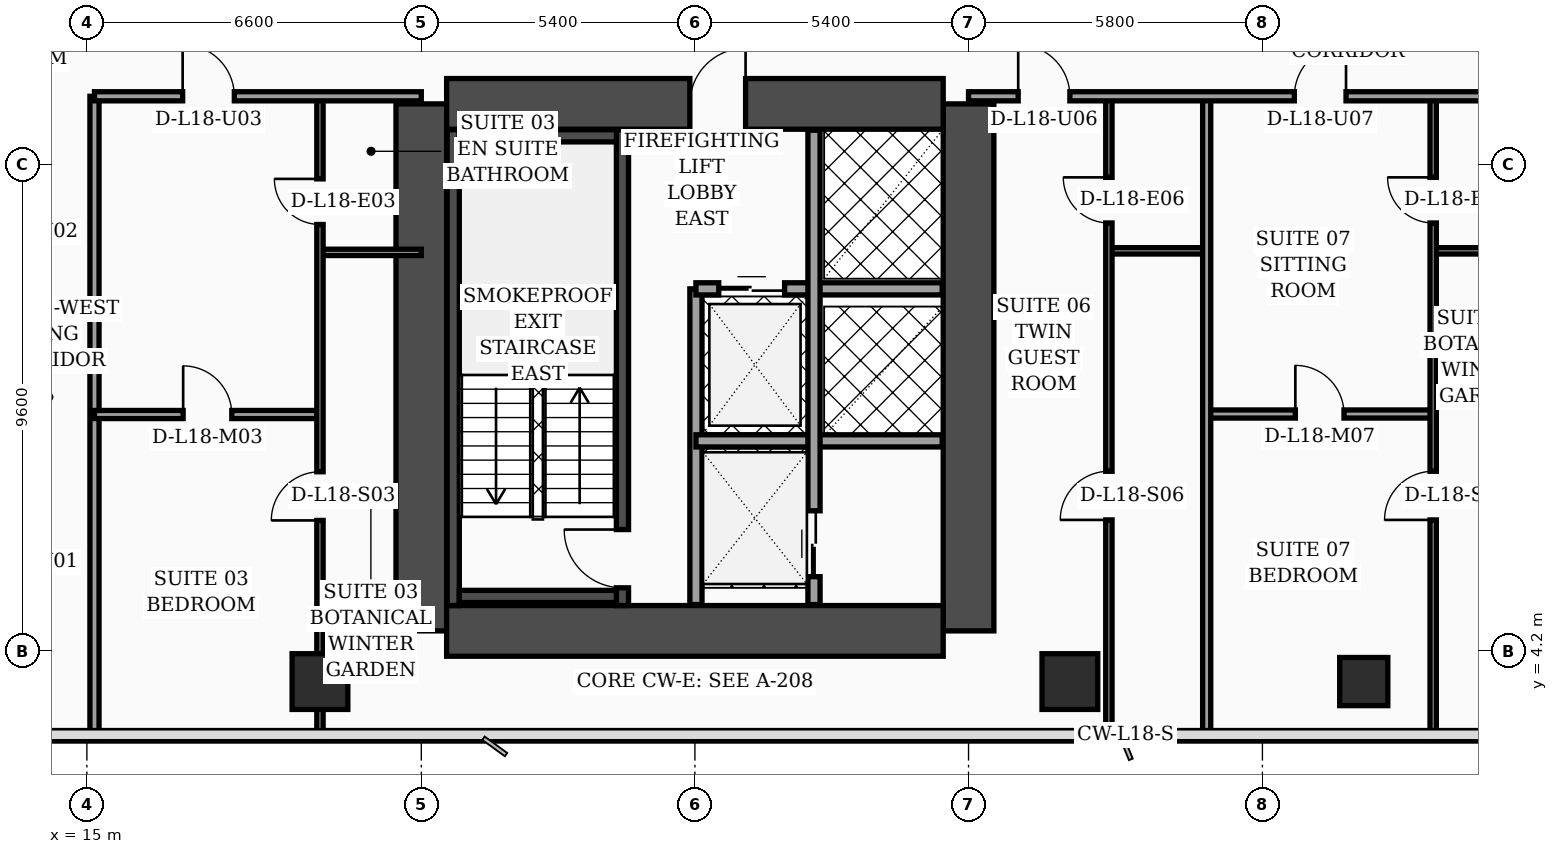
"""IFC4 building model, lengths in metres.
Left out: names, types, materials, properties, quantities, classifications, styles, units other than length and angle.
Written with IfcOpenShell. Run it as: python <this file> out.ifc"""

import sys

from ifc_helpers import new_model, si_unit, direction, frame, frame_2d, origin, origin_2d, place, context, subcontext, project, spatial, rectangle, hollow_rectangle, extrude, element, fill, save


model = new_model("IFC4")
c1 = context("Model", 3, precision=1e-05, world=origin(), true_north=direction((0.0, 1.0)))
c2 = subcontext(c1, "Body", "Model", "MODEL_VIEW")
j1 = project(units=[si_unit("LENGTHUNIT", "METRE"), si_unit("PLANEANGLEUNIT", "RADIAN")], contexts=[c1])
p1 = place(None, origin())
s1 = spatial("IfcSite", under=j1, at=p1, CompositionType="ELEMENT")
p2 = place(p1, origin())
s2 = spatial("IfcBuilding", under=s1, at=p2, CompositionType="ELEMENT")
p3 = place(p2, frame((0.0, 0.0, 77.4)))
s3 = spatial("IfcBuildingStorey", under=s2, at=p3, CompositionType="ELEMENT", Elevation=77.4)
for number, where, z_axis, x_axis in (
    (1, (21.6, 4.6, 0.0), (0.0, 0.0, 1.0), (0.0, 1.0, 0.0)),
    (2, (32.4, 4.6, 0.0), (0.0, 0.0, 1.0), (0.0, 1.0, 0.0)),
):
    element("IfcWall", number, at=place(p3, frame(where, z_axis=z_axis, x_axis=x_axis)), inside=s3, PredefinedType="SHEAR", context=c2, shape_type="SweptSolid", body=[
        extrude(rectangle(XDim=10.4, YDim=1.0, at=frame_2d((5.2, 0.0))), origin(), (0.0, 0.0, 1.0), 3.56),
    ])
p4 = place(p3, frame((22.1, 15.0, 0.0), z_axis=(0.0, 0.0, 1.0), x_axis=(1.0, 0.0, 0.0)))
e3 = element("IfcWall", 3, at=p4, inside=s3, PredefinedType="SHEAR", context=c2, shape_type="SweptSolid", body=[
    extrude(rectangle(XDim=9.8, YDim=1.0, at=frame_2d((4.9, 0.0))), origin(), (0.0, 0.0, 1.0), 3.56),
])
p5 = place(p4, frame((4.8, 0.0, 0.0)))
e4 = element("IfcOpeningElement", 4, at=p5, cuts=e3, PredefinedType="OPENING", context=c2, shape_type="SweptSolid", body=[
    extrude(rectangle(XDim=1.1, YDim=2.2, at=frame_2d((0.55, 1.1))), frame((0.0, 0.51, 0.0), z_axis=(0.0, -1.0, 0.0), x_axis=(1.0, 0.0, 0.0)), (0.0, 0.0, 1.0), 1.02),
])
p6 = place(p3, frame((22.1, 4.6, 0.0), z_axis=(0.0, 0.0, 1.0), x_axis=(1.0, 0.0, 0.0)))
e5 = element("IfcWall", 5, at=p6, inside=s3, PredefinedType="SHEAR", context=c2, shape_type="SweptSolid", body=[
    extrude(rectangle(XDim=9.8, YDim=1.0, at=frame_2d((4.9, 0.0))), origin(), (0.0, 0.0, 1.0), 3.56),
])
p7 = place(p3, frame((22.23, 5.1, 0.0), z_axis=(0.0, 0.0, 1.0), x_axis=(0.0, 1.0, 0.0)))
e6 = element("IfcWall", 6, at=p7, inside=s3, PredefinedType="SOLIDWALL", context=c2, shape_type="SweptSolid", body=[
    extrude(rectangle(XDim=9.39, YDim=0.24, at=frame_2d((4.695, 0.0))), origin(), (0.0, 0.0, 1.0), 3.56),
])
p8 = place(p3, frame((25.57, 5.1, 0.0), z_axis=(0.0, 0.0, 1.0), x_axis=(0.0, 1.0, 0.0)))
e7 = element("IfcWall", 7, at=p8, inside=s3, PredefinedType="SOLIDWALL", context=c2, shape_type="SweptSolid", body=[
    extrude(rectangle(XDim=9.39, YDim=0.24, at=frame_2d((4.695, 0.0))), origin(), (0.0, 0.0, 1.0), 3.56),
])
p9 = place(p8, frame((0.35, 0.0, 0.0)))
e8 = element("IfcOpeningElement", 8, at=p9, cuts=e7, PredefinedType="OPENING", context=c2, shape_type="SweptSolid", body=[
    extrude(rectangle(XDim=1.15, YDim=2.2, at=frame_2d((0.575, 1.1))), frame((0.0, 0.13, 0.0), z_axis=(0.0, -1.0, 0.0), x_axis=(1.0, 0.0, 0.0)), (0.0, 0.0, 1.0), 0.26),
])
for number, where, z_axis, x_axis in (
    (9, (22.35, 5.28, 0.0), (0.0, 0.0, 1.0), (1.0, 0.0, 0.0)),
    (10, (22.35, 14.37, 0.0), (0.0, 0.0, 1.0), (1.0, 0.0, 0.0)),
):
    element("IfcWall", number, at=place(p3, frame(where, z_axis=z_axis, x_axis=x_axis)), inside=s3, PredefinedType="SOLIDWALL", context=c2, shape_type="SweptSolid", body=[
        extrude(rectangle(XDim=3.1, YDim=0.24, at=frame_2d((1.55, 0.0))), origin(), (0.0, 0.0, 1.0), 3.56),
    ])
for number, where, z_axis, x_axis in (
    (11, (19.6, 3.6, 0.0), (0.0, 0.0, 1.0), (1.0, 0.0, 0.0)),
    (12, (34.4, 3.6, 0.0), (0.0, 0.0, 1.0), (1.0, 0.0, 0.0)),
):
    element("IfcColumn", number, at=place(p3, frame(where, z_axis=z_axis, x_axis=x_axis)), inside=s3, PredefinedType="COLUMN", context=c2, shape_type="SweptSolid", body=[
        extrude(hollow_rectangle(XDim=1.1, YDim=1.1, WallThickness=0.045, at=origin_2d()), origin(), (0.0, 0.0, 1.0), 3.56),
    ])
p10 = place(p3, frame((40.2, 3.6, 0.0), z_axis=(0.0, 0.0, 1.0), x_axis=(1.0, 0.0, 0.0)))
e13 = element("IfcColumn", 13, at=p10, inside=s3, PredefinedType="COLUMN", context=c2, shape_type="SweptSolid", body=[
    extrude(hollow_rectangle(XDim=0.95, YDim=0.95, WallThickness=0.04, at=origin_2d()), origin(), (0.0, 0.0, 1.0), 3.56),
])
p11 = place(p3, frame((27.02, 5.12, 0.0), z_axis=(0.0, 0.0, 1.0), x_axis=(0.0, 1.0, 0.0)))
e14 = element("IfcWall", 14, at=p11, inside=s3, PredefinedType="SOLIDWALL", context=c2, shape_type="SweptSolid", body=[
    extrude(rectangle(XDim=6.23, YDim=0.24, at=frame_2d((3.115, 0.0))), origin(), (0.0, 0.0, 1.0), 3.56),
])
p12 = place(p3, frame((27.02, 11.35, 0.0), z_axis=(0.0, 0.0, 1.0), x_axis=(1.0, 0.0, 0.0)))
e15 = element("IfcWall", 15, at=p12, inside=s3, PredefinedType="SOLIDWALL", context=c2, shape_type="SweptSolid", body=[
    extrude(rectangle(XDim=4.86, YDim=0.24, at=frame_2d((2.43, 0.0))), origin(), (0.0, 0.0, 1.0), 3.56),
])
p13 = place(p12, frame((0.45, 0.0, 0.0)))
e16 = element("IfcOpeningElement", 16, at=p13, cuts=e15, PredefinedType="OPENING", context=c2, shape_type="SweptSolid", body=[
    extrude(rectangle(XDim=1.3, YDim=2.35, at=frame_2d((0.65, 1.175))), frame((0.0, 0.13, 0.0), z_axis=(0.0, -1.0, 0.0), x_axis=(1.0, 0.0, 0.0)), (0.0, 0.0, 1.0), 0.26),
])
p14 = place(p3, frame((27.02, 8.35, 0.0), z_axis=(0.0, 0.0, 1.0), x_axis=(1.0, 0.0, 0.0)))
e17 = element("IfcWall", 17, at=p14, inside=s3, PredefinedType="SOLIDWALL", context=c2, shape_type="SweptSolid", body=[
    extrude(rectangle(XDim=4.86, YDim=0.24, at=frame_2d((2.43, 0.0))), origin(), (0.0, 0.0, 1.0), 3.56),
])
p15 = place(p3, frame((29.35, 5.12, 0.0), z_axis=(0.0, 0.0, 1.0), x_axis=(0.0, 1.0, 0.0)))
e18 = element("IfcWall", 18, at=p15, inside=s3, PredefinedType="SOLIDWALL", context=c2, shape_type="SweptSolid", body=[
    extrude(rectangle(XDim=9.36, YDim=0.24, at=frame_2d((4.68, 0.0))), origin(), (0.0, 0.0, 1.0), 3.56),
])
p16 = place(p15, frame((0.55, 0.0, 0.0)))
e19 = element("IfcOpeningElement", 19, at=p16, cuts=e18, PredefinedType="OPENING", context=c2, shape_type="SweptSolid", body=[
    extrude(rectangle(XDim=1.3, YDim=2.35, at=frame_2d((0.65, 1.175))), frame((0.0, 0.13, 0.0), z_axis=(0.0, -1.0, 0.0), x_axis=(1.0, 0.0, 0.0)), (0.0, 0.0, 1.0), 0.26),
])
p17 = place(p3, frame((15.15, 2.44, 0.0), z_axis=(0.0, 0.0, 1.0), x_axis=(0.0, 1.0, 0.0)))
e20 = element("IfcWall", 20, at=p17, inside=s3, PredefinedType="PARTITIONING", context=c2, shape_type="SweptSolid", body=[
    extrude(rectangle(XDim=12.71, YDim=0.18, at=frame_2d((6.355, 0.0))), origin(), (0.0, 0.0, 1.0), 3.04),
])
p18 = place(p3, frame((19.6, 12.07, 0.0), z_axis=(0.0, 0.0, 1.0), x_axis=(1.0, 0.0, 0.0)))
e21 = element("IfcWall", 21, at=p18, inside=s3, PredefinedType="PARTITIONING", context=c2, shape_type="SweptSolid", body=[
    extrude(rectangle(XDim=2.0, YDim=0.125, at=frame_2d((1.0, 0.0))), origin(), (0.0, 0.0, 1.0), 3.56),
])
p19 = place(p3, frame((15.15, 8.87, 0.0), z_axis=(0.0, 0.0, 1.0), x_axis=(1.0, 0.0, 0.0)))
e22 = element("IfcWall", 22, at=p19, inside=s3, PredefinedType="PARTITIONING", context=c2, shape_type="SweptSolid", body=[
    extrude(rectangle(XDim=4.45, YDim=0.16, at=frame_2d((2.225, 0.0))), origin(), (0.0, 0.0, 1.0), 3.56),
])
p20 = place(p19, frame((1.75, 0.0, 0.0)))
e23 = element("IfcOpeningElement", 23, at=p20, cuts=e22, PredefinedType="OPENING", context=c2, shape_type="SweptSolid", body=[
    extrude(rectangle(XDim=0.96, YDim=2.2, at=frame_2d((0.48, 1.1))), frame((0.0, 0.09, 0.0), z_axis=(0.0, -1.0, 0.0), x_axis=(1.0, 0.0, 0.0)), (0.0, 0.0, 1.0), 0.18),
])
p21 = place(p3, frame((19.6, 2.44, 0.0), z_axis=(0.0, 0.0, 1.0), x_axis=(0.0, 1.0, 0.0)))
e24 = element("IfcWall", 24, at=p21, inside=s3, PredefinedType="PARTITIONING", context=c2, shape_type="SweptSolid", body=[
    extrude(rectangle(XDim=12.71, YDim=0.125, at=frame_2d((6.355, 0.0))), origin(), (0.0, 0.0, 1.0), 2.34),
])
p22 = place(p21, frame((4.34, 0.0, 0.0)))
e25 = element("IfcOpeningElement", 25, at=p22, cuts=e24, PredefinedType="OPENING", context=c2, shape_type="SweptSolid", body=[
    extrude(rectangle(XDim=0.96, YDim=2.2, at=frame_2d((0.48, 1.1))), frame((0.0, 0.073, 0.0), z_axis=(0.0, -1.0, 0.0), x_axis=(1.0, 0.0, 0.0)), (0.0, 0.0, 1.0), 0.145),
])
p23 = place(p21, frame((10.18, 0.0, 0.0)))
e26 = element("IfcOpeningElement", 26, at=p23, cuts=e24, PredefinedType="OPENING", context=c2, shape_type="SweptSolid", body=[
    extrude(rectangle(XDim=0.9, YDim=2.15, at=frame_2d((0.45, 1.075))), frame((0.0, 0.073, 0.0), z_axis=(0.0, -1.0, 0.0), x_axis=(1.0, 0.0, 0.0)), (0.0, 0.0, 1.0), 0.145),
])
p24 = place(p3, frame((15.15, 15.15, 0.0), z_axis=(0.0, 0.0, 1.0), x_axis=(1.0, 0.0, 0.0)))
e27 = element("IfcWall", 27, at=p24, inside=s3, PredefinedType="PARTITIONING", context=c2, shape_type="SweptSolid", body=[
    extrude(rectangle(XDim=6.45, YDim=0.18, at=frame_2d((3.225, 0.0))), origin(), (0.0, 0.0, 1.0), 2.34),
])
p25 = place(p24, frame((1.74, 0.0, 0.0)))
e28 = element("IfcOpeningElement", 28, at=p25, cuts=e27, PredefinedType="OPENING", context=c2, shape_type="SweptSolid", body=[
    extrude(rectangle(XDim=1.02, YDim=2.2, at=frame_2d((0.51, 1.1))), frame((0.0, 0.1, 0.0), z_axis=(0.0, -1.0, 0.0), x_axis=(1.0, 0.0, 0.0)), (0.0, 0.0, 1.0), 0.2),
])
p26 = place(p3, frame((35.17, 12.1, 0.0), z_axis=(0.0, 0.0, 1.0), x_axis=(1.0, 0.0, 0.0)))
e29 = element("IfcWall", 29, at=p26, inside=s3, PredefinedType="PARTITIONING", context=c2, shape_type="SweptSolid", body=[
    extrude(rectangle(XDim=1.93, YDim=0.125, at=frame_2d((0.965, 0.0))), origin(), (0.0, 0.0, 1.0), 3.56),
])
p27 = place(p3, frame((35.17, 2.44, 0.0), z_axis=(0.0, 0.0, 1.0), x_axis=(0.0, 1.0, 0.0)))
e30 = element("IfcWall", 30, at=p27, inside=s3, PredefinedType="PARTITIONING", context=c2, shape_type="SweptSolid", body=[
    extrude(rectangle(XDim=12.71, YDim=0.125, at=frame_2d((6.355, 0.0))), origin(), (0.0, 0.0, 1.0), 2.84),
])
p28 = place(p27, frame((4.35, 0.0, 0.0)))
e31 = element("IfcOpeningElement", 31, at=p28, cuts=e30, PredefinedType="OPENING", context=c2, shape_type="SweptSolid", body=[
    extrude(rectangle(XDim=0.96, YDim=2.2, at=frame_2d((0.48, 1.1))), frame((0.0, 0.073, 0.0), z_axis=(0.0, -1.0, 0.0), x_axis=(1.0, 0.0, 0.0)), (0.0, 0.0, 1.0), 0.145),
])
p29 = place(p27, frame((10.21, 0.0, 0.0)))
e32 = element("IfcOpeningElement", 32, at=p29, cuts=e30, PredefinedType="OPENING", context=c2, shape_type="SweptSolid", body=[
    extrude(rectangle(XDim=0.9, YDim=2.15, at=frame_2d((0.45, 1.075))), frame((0.0, 0.073, 0.0), z_axis=(0.0, -1.0, 0.0), x_axis=(1.0, 0.0, 0.0)), (0.0, 0.0, 1.0), 0.145),
])
p30 = place(p3, frame((41.57, 12.1, 0.0), z_axis=(0.0, 0.0, 1.0), x_axis=(1.0, 0.0, 0.0)))
e33 = element("IfcWall", 33, at=p30, inside=s3, PredefinedType="PARTITIONING", context=c2, shape_type="SweptSolid", body=[
    extrude(rectangle(XDim=1.93, YDim=0.125, at=frame_2d((0.965, 0.0))), origin(), (0.0, 0.0, 1.0), 3.56),
])
p31 = place(p3, frame((37.1, 8.88, 0.0), z_axis=(0.0, 0.0, 1.0), x_axis=(1.0, 0.0, 0.0)))
e34 = element("IfcWall", 34, at=p31, inside=s3, PredefinedType="PARTITIONING", context=c2, shape_type="SweptSolid", body=[
    extrude(rectangle(XDim=4.47, YDim=0.16, at=frame_2d((2.235, 0.0))), origin(), (0.0, 0.0, 1.0), 2.84),
])
p32 = place(p31, frame((1.75, 0.0, 0.0)))
e35 = element("IfcOpeningElement", 35, at=p32, cuts=e34, PredefinedType="OPENING", context=c2, shape_type="SweptSolid", body=[
    extrude(rectangle(XDim=0.96, YDim=2.2, at=frame_2d((0.48, 1.1))), frame((0.0, 0.09, 0.0), z_axis=(0.0, -1.0, 0.0), x_axis=(1.0, 0.0, 0.0)), (0.0, 0.0, 1.0), 0.18),
])
p33 = place(p3, frame((41.57, 2.44, 0.0), z_axis=(0.0, 0.0, 1.0), x_axis=(0.0, 1.0, 0.0)))
e36 = element("IfcWall", 36, at=p33, inside=s3, PredefinedType="PARTITIONING", context=c2, shape_type="SweptSolid", body=[
    extrude(rectangle(XDim=12.71, YDim=0.125, at=frame_2d((6.355, 0.0))), origin(), (0.0, 0.0, 1.0), 3.04),
])
p34 = place(p33, frame((4.35, 0.0, 0.0)))
e37 = element("IfcOpeningElement", 37, at=p34, cuts=e36, PredefinedType="OPENING", context=c2, shape_type="SweptSolid", body=[
    extrude(rectangle(XDim=0.96, YDim=2.2, at=frame_2d((0.48, 1.1))), frame((0.0, 0.073, 0.0), z_axis=(0.0, -1.0, 0.0), x_axis=(1.0, 0.0, 0.0)), (0.0, 0.0, 1.0), 0.145),
])
p35 = place(p33, frame((10.21, 0.0, 0.0)))
e38 = element("IfcOpeningElement", 38, at=p35, cuts=e36, PredefinedType="OPENING", context=c2, shape_type="SweptSolid", body=[
    extrude(rectangle(XDim=0.9, YDim=2.15, at=frame_2d((0.45, 1.075))), frame((0.0, 0.073, 0.0), z_axis=(0.0, -1.0, 0.0), x_axis=(1.0, 0.0, 0.0)), (0.0, 0.0, 1.0), 0.145),
])
p36 = place(p3, frame((37.1, 2.44, 0.0), z_axis=(0.0, 0.0, 1.0), x_axis=(0.0, 1.0, 0.0)))
e39 = element("IfcWall", 39, at=p36, inside=s3, PredefinedType="PARTITIONING", context=c2, shape_type="SweptSolid", body=[
    extrude(rectangle(XDim=12.71, YDim=0.16, at=frame_2d((6.355, 0.0))), origin(), (0.0, 0.0, 1.0), 2.84),
])
p37 = place(p3, frame((32.4, 15.15, 0.0), z_axis=(0.0, 0.0, 1.0), x_axis=(1.0, 0.0, 0.0)))
e40 = element("IfcWall", 40, at=p37, inside=s3, PredefinedType="PARTITIONING", context=c2, shape_type="SweptSolid", body=[
    extrude(rectangle(XDim=11.1, YDim=0.18, at=frame_2d((5.55, 0.0))), origin(), (0.0, 0.0, 1.0), 2.84),
])
p38 = place(p37, frame((0.98, 0.0, 0.0)))
e41 = element("IfcOpeningElement", 41, at=p38, cuts=e40, PredefinedType="OPENING", context=c2, shape_type="SweptSolid", body=[
    extrude(rectangle(XDim=1.02, YDim=2.2, at=frame_2d((0.51, 1.1))), frame((0.0, 0.1, 0.0), z_axis=(0.0, -1.0, 0.0), x_axis=(1.0, 0.0, 0.0)), (0.0, 0.0, 1.0), 0.2),
])
p39 = place(p37, frame((6.43, 0.0, 0.0)))
e42 = element("IfcOpeningElement", 42, at=p39, cuts=e40, PredefinedType="OPENING", context=c2, shape_type="SweptSolid", body=[
    extrude(rectangle(XDim=1.02, YDim=2.2, at=frame_2d((0.51, 1.1))), frame((0.0, 0.1, 0.0), z_axis=(0.0, -1.0, 0.0), x_axis=(1.0, 0.0, 0.0)), (0.0, 0.0, 1.0), 0.2),
])
p40 = place(p13, origin())
e43 = element("IfcDoor", 43, at=p40, inside=s3, OperationType="DOUBLE_DOOR_SLIDING", PredefinedType="DOOR", context=c2, shape_type="SweptSolid", body=[
    extrude(rectangle(XDim=1.3, YDim=2.35, at=frame_2d((0.65, 1.175))), frame((0.0, 0.025, 0.0), z_axis=(0.0, -1.0, 0.0), x_axis=(1.0, 0.0, 0.0)), (0.0, 0.0, 1.0), 0.05),
])
fill(e16, e43)
p41 = place(p16, origin())
e44 = element("IfcDoor", 44, at=p41, inside=s3, OperationType="DOUBLE_DOOR_SLIDING", PredefinedType="DOOR", context=c2, shape_type="SweptSolid", body=[
    extrude(rectangle(XDim=1.3, YDim=2.35, at=frame_2d((0.65, 1.175))), frame((0.0, 0.025, 0.0), z_axis=(0.0, -1.0, 0.0), x_axis=(1.0, 0.0, 0.0)), (0.0, 0.0, 1.0), 0.05),
])
fill(e19, e44)
p42 = place(p20, origin())
e45 = element("IfcDoor", 45, at=p42, inside=s3, OperationType="SINGLE_SWING_LEFT", PredefinedType="DOOR", context=c2, shape_type="SweptSolid", body=[
    extrude(rectangle(XDim=0.96, YDim=2.2, at=frame_2d((0.48, 1.1))), frame((0.0, 0.025, 0.0), z_axis=(0.0, -1.0, 0.0), x_axis=(1.0, 0.0, 0.0)), (0.0, 0.0, 1.0), 0.05),
])
fill(e23, e45)
p43 = place(p22, origin())
e46 = element("IfcDoor", 46, at=p43, inside=s3, OperationType="SINGLE_SWING_LEFT", PredefinedType="DOOR", context=c2, shape_type="SweptSolid", body=[
    extrude(rectangle(XDim=0.96, YDim=2.2, at=frame_2d((0.48, 1.1))), frame((0.0, 0.025, 0.0), z_axis=(0.0, -1.0, 0.0), x_axis=(1.0, 0.0, 0.0)), (0.0, 0.0, 1.0), 0.05),
])
fill(e25, e46)
p44 = place(p23, origin())
e47 = element("IfcDoor", 47, at=p44, inside=s3, OperationType="SINGLE_SWING_RIGHT", PredefinedType="DOOR", context=c2, shape_type="SweptSolid", body=[
    extrude(rectangle(XDim=0.9, YDim=2.15, at=frame_2d((0.45, 1.075))), frame((0.0, 0.025, 0.0), z_axis=(0.0, -1.0, 0.0), x_axis=(1.0, 0.0, 0.0)), (0.0, 0.0, 1.0), 0.05),
])
fill(e26, e47)
p45 = place(p25, origin())
e48 = element("IfcDoor", 48, at=p45, inside=s3, OperationType="SINGLE_SWING_LEFT", PredefinedType="DOOR", context=c2, shape_type="SweptSolid", body=[
    extrude(rectangle(XDim=1.02, YDim=2.2, at=frame_2d((0.51, 1.1))), frame((0.0, 0.025, 0.0), z_axis=(0.0, -1.0, 0.0), x_axis=(1.0, 0.0, 0.0)), (0.0, 0.0, 1.0), 0.05),
])
fill(e28, e48)
p46 = place(p28, origin())
e49 = element("IfcDoor", 49, at=p46, inside=s3, OperationType="SINGLE_SWING_LEFT", PredefinedType="DOOR", context=c2, shape_type="SweptSolid", body=[
    extrude(rectangle(XDim=0.96, YDim=2.2, at=frame_2d((0.48, 1.1))), frame((0.0, 0.025, 0.0), z_axis=(0.0, -1.0, 0.0), x_axis=(1.0, 0.0, 0.0)), (0.0, 0.0, 1.0), 0.05),
])
fill(e31, e49)
p47 = place(p29, origin())
e50 = element("IfcDoor", 50, at=p47, inside=s3, OperationType="SINGLE_SWING_RIGHT", PredefinedType="DOOR", context=c2, shape_type="SweptSolid", body=[
    extrude(rectangle(XDim=0.9, YDim=2.15, at=frame_2d((0.45, 1.075))), frame((0.0, 0.025, 0.0), z_axis=(0.0, -1.0, 0.0), x_axis=(1.0, 0.0, 0.0)), (0.0, 0.0, 1.0), 0.05),
])
fill(e32, e50)
p48 = place(p32, origin())
e51 = element("IfcDoor", 51, at=p48, inside=s3, OperationType="SINGLE_SWING_LEFT", PredefinedType="DOOR", context=c2, shape_type="SweptSolid", body=[
    extrude(rectangle(XDim=0.96, YDim=2.2, at=frame_2d((0.48, 1.1))), frame((0.0, 0.025, 0.0), z_axis=(0.0, -1.0, 0.0), x_axis=(1.0, 0.0, 0.0)), (0.0, 0.0, 1.0), 0.05),
])
fill(e35, e51)
p49 = place(p34, origin())
e52 = element("IfcDoor", 52, at=p49, inside=s3, OperationType="SINGLE_SWING_LEFT", PredefinedType="DOOR", context=c2, shape_type="SweptSolid", body=[
    extrude(rectangle(XDim=0.96, YDim=2.2, at=frame_2d((0.48, 1.1))), frame((0.0, 0.025, 0.0), z_axis=(0.0, -1.0, 0.0), x_axis=(1.0, 0.0, 0.0)), (0.0, 0.0, 1.0), 0.05),
])
fill(e37, e52)
p50 = place(p35, origin())
e53 = element("IfcDoor", 53, at=p50, inside=s3, OperationType="SINGLE_SWING_RIGHT", PredefinedType="DOOR", context=c2, shape_type="SweptSolid", body=[
    extrude(rectangle(XDim=0.9, YDim=2.15, at=frame_2d((0.45, 1.075))), frame((0.0, 0.025, 0.0), z_axis=(0.0, -1.0, 0.0), x_axis=(1.0, 0.0, 0.0)), (0.0, 0.0, 1.0), 0.05),
])
fill(e38, e53)
p51 = place(p38, origin())
e54 = element("IfcDoor", 54, at=p51, inside=s3, OperationType="SINGLE_SWING_LEFT", PredefinedType="DOOR", context=c2, shape_type="SweptSolid", body=[
    extrude(rectangle(XDim=1.02, YDim=2.2, at=frame_2d((0.51, 1.1))), frame((0.0, 0.025, 0.0), z_axis=(0.0, -1.0, 0.0), x_axis=(1.0, 0.0, 0.0)), (0.0, 0.0, 1.0), 0.05),
])
fill(e41, e54)
p52 = place(p39, origin())
e55 = element("IfcDoor", 55, at=p52, inside=s3, OperationType="SINGLE_SWING_RIGHT", PredefinedType="DOOR", context=c2, shape_type="SweptSolid", body=[
    extrude(rectangle(XDim=1.02, YDim=2.2, at=frame_2d((0.51, 1.1))), frame((0.0, 0.025, 0.0), z_axis=(0.0, -1.0, 0.0), x_axis=(1.0, 0.0, 0.0)), (0.0, 0.0, 1.0), 0.05),
])
fill(e42, e55)
p53 = place(p9, origin())
e56 = element("IfcDoor", 56, at=p53, inside=s3, OperationType="SINGLE_SWING_RIGHT", PredefinedType="DOOR", context=c2, shape_type="SweptSolid", body=[
    extrude(rectangle(XDim=1.15, YDim=2.2, at=frame_2d((0.575, 1.1))), frame((0.0, 0.025, 0.0), z_axis=(0.0, -1.0, 0.0), x_axis=(1.0, 0.0, 0.0)), (0.0, 0.0, 1.0), 0.05),
])
fill(e8, e56)
p54 = place(p5, origin())
e57 = element("IfcDoor", 57, at=p54, inside=s3, OperationType="SINGLE_SWING_RIGHT", PredefinedType="DOOR", context=c2, shape_type="SweptSolid", body=[
    extrude(rectangle(XDim=1.1, YDim=2.2, at=frame_2d((0.55, 1.1))), frame((0.0, 0.025, 0.0), z_axis=(0.0, -1.0, 0.0), x_axis=(1.0, 0.0, 0.0)), (0.0, 0.0, 1.0), 0.05),
])
fill(e4, e57)
save(model, sys.argv[1])
